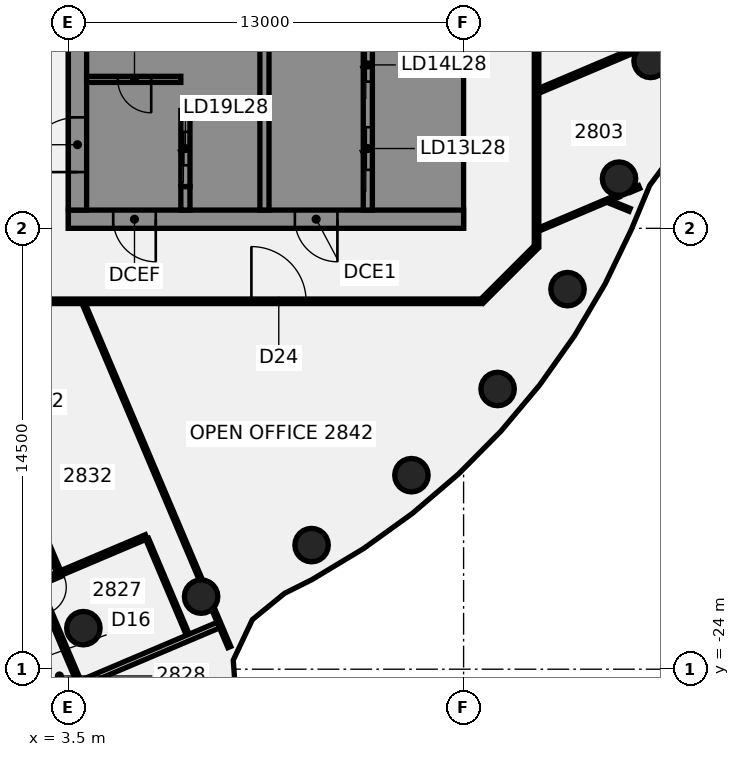
"""IFC4 building model, lengths in metres.
Left out: names, types, materials, properties, quantities, classifications, styles, units other than length and angle.
Written with IfcOpenShell. Run it as: python <this file> out.ifc"""

import sys

from ifc_helpers import new_model, si_unit, direction, frame, frame_2d, origin, origin_2d, place, context, subcontext, project, spatial, polyline, rectangle, circle, outline, extrude, element, fill, save


model = new_model("IFC4")
c1 = context("Model", 3, precision=1e-05, world=origin(), true_north=direction((0.0, 1.0)))
c2 = subcontext(c1, "Body", "Model", "MODEL_VIEW")
j1 = project(units=[si_unit("LENGTHUNIT", "METRE"), si_unit("PLANEANGLEUNIT", "RADIAN")], contexts=[c1])
p1 = place(None, origin())
s1 = spatial("IfcSite", under=j1, at=p1, CompositionType="ELEMENT")
p2 = place(p1, origin())
s2 = spatial("IfcBuilding", under=s1, at=p2, CompositionType="ELEMENT")
p3 = place(p2, frame((0.0, 0.0, 117.25)))
s3 = spatial("IfcBuildingStorey", under=s2, at=p3, CompositionType="ELEMENT", Elevation=117.25)
for number, where, z_axis, x_axis in (
    (1, (3.994, -22.651, -0.14), (0.0, 0.0, 1.0), (1.0, 0.0, 0.0)),
    (2, (7.866, -21.613, -0.14), (0.0, 0.0, 1.0), (1.0, 0.0, 0.0)),
    (3, (11.5, -19.919, -0.14), (0.0, 0.0, 1.0), (1.0, 0.0, 0.0)),
    (4, (14.784, -17.619, -0.14), (0.0, 0.0, 1.0), (1.0, 0.0, 0.0)),
    (5, (17.619, -14.784, -0.14), (0.0, 0.0, 1.0), (1.0, 0.0, 0.0)),
    (6, (19.919, -11.5, -0.14), (0.0, 0.0, 1.0), (1.0, 0.0, 0.0)),
    (7, (21.613, -7.866, -0.14), (0.0, 0.0, 1.0), (1.0, 0.0, 0.0)),
    (8, (22.651, -3.994, -0.14), (0.0, 0.0, 1.0), (1.0, 0.0, 0.0)),
):
    element("IfcColumn", number, at=place(p3, frame(where, z_axis=z_axis, x_axis=x_axis)), inside=s3, PredefinedType="COLUMN", context=c2, shape_type="SweptSolid", body=[
        extrude(circle(Radius=0.55, at=origin_2d()), origin(), (0.0, 0.0, 1.0), 3.75),
    ])
p4 = place(p3, frame((-0.554, -11.988, 0.0), z_axis=(0.0, 0.0, 1.0), x_axis=(0.390471755415, -0.920614907669, 0.0)))
e9 = element("IfcWall", 9, at=p4, inside=s3, PredefinedType="PARTITIONING", context=c2, shape_type="SweptSolid", body=[
    extrude(rectangle(XDim=9.554, YDim=0.15, at=frame_2d((4.777, 0.0))), origin(), (0.0, 0.0, 1.0), 3.01),
])
p5 = place(p4, frame((3.055, 0.0, 0.0)))
e10 = element("IfcOpeningElement", 10, at=p5, cuts=e9, PredefinedType="OPENING", context=c2, shape_type="SweptSolid", body=[
    extrude(rectangle(XDim=0.9, YDim=2.1, at=frame_2d((0.45, 1.05))), frame((0.0, 0.085, 0.0), z_axis=(0.0, -1.0, 0.0), x_axis=(1.0, 0.0, 0.0)), (0.0, 0.0, 1.0), 0.17),
])
p6 = place(p3, frame((1.68, -22.889, 0.0), z_axis=(0.0, 0.0, 1.0), x_axis=(0.390687971065, -0.920523171498, 0.0)))
e11 = element("IfcWall", 11, at=p6, inside=s3, PredefinedType="PARTITIONING", context=c2, shape_type="SweptSolid", body=[
    extrude(rectangle(XDim=15.75, YDim=0.15, at=frame_2d((7.875, 0.0))), origin(), (0.0, 0.0, 1.0), 3.01),
])
p7 = place(p6, frame((0.525, 0.0, 0.0)))
e12 = element("IfcOpeningElement", 12, at=p7, cuts=e11, PredefinedType="OPENING", context=c2, shape_type="SweptSolid", body=[
    extrude(rectangle(XDim=1.0, YDim=2.1, at=frame_2d((0.5, 1.05))), frame((0.0, 0.085, 0.0), z_axis=(0.0, -1.0, 0.0), x_axis=(1.0, 0.0, 0.0)), (0.0, 0.0, 1.0), 0.17),
])
p8 = place(p6, frame((12.075, 0.0, 0.0)))
e13 = element("IfcOpeningElement", 13, at=p8, cuts=e11, PredefinedType="OPENING", context=c2, shape_type="SweptSolid", body=[
    extrude(rectangle(XDim=0.9, YDim=2.1, at=frame_2d((0.45, 1.05))), frame((0.0, 0.085, 0.0), z_axis=(0.0, -1.0, 0.0), x_axis=(1.0, 0.0, 0.0)), (0.0, 0.0, 1.0), 0.17),
])
p9 = place(p6, frame((3.226, 0.0, 0.0)))
e14 = element("IfcOpeningElement", 14, at=p9, cuts=e11, PredefinedType="OPENING", context=c2, shape_type="SweptSolid", body=[
    extrude(rectangle(XDim=1.8, YDim=2.1, at=frame_2d((0.9, 1.05))), frame((0.0, 0.085, 0.0), z_axis=(0.0, -1.0, 0.0), x_axis=(1.0, 0.0, 0.0)), (0.0, 0.0, 1.0), 0.17),
])
p10 = place(p3, frame((2.48, -21.188, 0.0), z_axis=(0.0, 0.0, 1.0), x_axis=(0.390054258105, -0.920791874277, 0.0)))
e15 = element("IfcWall", 15, at=p10, inside=s3, PredefinedType="PARTITIONING", context=c2, shape_type="SweptSolid", body=[
    extrude(rectangle(XDim=3.479, YDim=0.15, at=frame_2d((1.74, 0.0))), origin(), (0.0, 0.0, 1.0), 3.01),
])
p11 = place(p10, frame((0.13, 0.0, 0.0)))
e16 = element("IfcOpeningElement", 16, at=p11, cuts=e15, PredefinedType="OPENING", context=c2, shape_type="SweptSolid", body=[
    extrude(rectangle(XDim=0.9, YDim=2.1, at=frame_2d((0.45, 1.05))), frame((0.0, 0.085, 0.0), z_axis=(0.0, -1.0, 0.0), x_axis=(1.0, 0.0, 0.0)), (0.0, 0.0, 1.0), 0.17),
])
p12 = place(p3, frame((4.004, -11.978, 0.0), z_axis=(0.0, 0.0, 1.0), x_axis=(0.390495164952, -0.920604978342, 0.0)))
e17 = element("IfcWall", 17, at=p12, inside=s3, PredefinedType="PARTITIONING", context=c2, shape_type="SweptSolid", body=[
    extrude(rectangle(XDim=9.861, YDim=0.1, at=frame_2d((4.93, 0.0))), origin(), (0.0, 0.0, 1.0), 3.01),
])
p13 = place(p3, frame((8.252, -21.992, 0.0), z_axis=(0.0, 0.0, 1.0), x_axis=(0.390522765708, -0.920593270377, 0.0)))
e18 = element("IfcWall", 18, at=p13, inside=s3, PredefinedType="PARTITIONING", context=c2, shape_type="SweptSolid", body=[
    extrude(rectangle(XDim=1.389, YDim=0.1, at=frame_2d((0.695, 0.0))), origin(), (0.0, 0.0, 1.0), 3.01),
])
p14 = place(p3, frame((6.091, -19.715, 0.0), z_axis=(0.0, 0.0, 1.0), x_axis=(0.390573680368, -0.920571670324, 0.0)))
e19 = element("IfcWall", 19, at=p14, inside=s3, PredefinedType="PARTITIONING", context=c2, shape_type="SweptSolid", body=[
    extrude(rectangle(XDim=3.42, YDim=0.1, at=frame_2d((1.71, 0.0))), origin(), (0.0, 0.0, 1.0), 3.01),
])
p15 = place(p3, frame((22.561, 8.406, 0.0), z_axis=(0.0, 0.0, 1.0), x_axis=(0.390723572262, -0.920508060844, 0.0)))
e20 = element("IfcWall", 20, at=p15, inside=s3, PredefinedType="PARTITIONING", context=c2, shape_type="SweptSolid", body=[
    extrude(rectangle(XDim=14.219, YDim=0.2, at=frame_2d((7.109, 0.0))), origin(), (0.0, 0.0, 1.0), 3.01),
])
p16 = place(p15, frame((6.919, 0.0, 0.0)))
e21 = element("IfcOpeningElement", 21, at=p16, cuts=e20, PredefinedType="OPENING", context=c2, shape_type="SweptSolid", body=[
    extrude(rectangle(XDim=1.4, YDim=2.1, at=frame_2d((0.7, 1.05))), frame((0.0, 0.11, 0.0), z_axis=(0.0, -1.0, 0.0), x_axis=(1.0, 0.0, 0.0)), (0.0, 0.0, 1.0), 0.22),
])
p17 = place(p3, frame((21.307, -8.627, 0.0), z_axis=(0.0, 0.0, 1.0), x_axis=(0.926918170947, -0.375263513238, 0.0)))
e22 = element("IfcWall", 22, at=p17, inside=s3, PredefinedType="PARTITIONING", context=c2, shape_type="SweptSolid", body=[
    extrude(rectangle(XDim=0.706, YDim=0.1, at=frame_2d((0.353, 0.0))), origin(), (0.0, 0.0, 1.0), 3.01),
])
p18 = place(p3, frame((-17.1, -11.9, 0.0), z_axis=(0.0, 0.0, 1.0), x_axis=(1.0, 0.0, 0.0)))
e23 = element("IfcWall", 23, at=p18, inside=s3, PredefinedType="PARTITIONING", context=c2, shape_type="SweptSolid", body=[
    extrude(rectangle(XDim=34.165, YDim=0.15, at=frame_2d((17.083, 0.0))), origin(), (0.0, 0.0, 1.0), 3.01),
])
p19 = place(p18, frame((11.973, 0.0, 0.0)))
e24 = element("IfcOpeningElement", 24, at=p19, cuts=e23, PredefinedType="OPENING", context=c2, shape_type="SweptSolid", body=[
    extrude(rectangle(XDim=1.8, YDim=2.1, at=frame_2d((0.9, 1.05))), frame((0.0, 0.085, 0.0), z_axis=(0.0, -1.0, 0.0), x_axis=(1.0, 0.0, 0.0)), (0.0, 0.0, 1.0), 0.17),
])
p20 = place(p18, frame((2.1, 0.0, 0.0)))
e25 = element("IfcOpeningElement", 25, at=p20, cuts=e23, PredefinedType="OPENING", context=c2, shape_type="SweptSolid", body=[
    extrude(rectangle(XDim=1.8, YDim=2.1, at=frame_2d((0.9, 1.05))), frame((0.0, 0.085, 0.0), z_axis=(0.0, -1.0, 0.0), x_axis=(1.0, 0.0, 0.0)), (0.0, 0.0, 1.0), 0.17),
])
p21 = place(p18, frame((26.621, 0.0, 0.0)))
e26 = element("IfcOpeningElement", 26, at=p21, cuts=e23, PredefinedType="OPENING", context=c2, shape_type="SweptSolid", body=[
    extrude(rectangle(XDim=1.8, YDim=2.1, at=frame_2d((0.9, 1.05))), frame((0.0, 0.085, 0.0), z_axis=(0.0, -1.0, 0.0), x_axis=(1.0, 0.0, 0.0)), (0.0, 0.0, 1.0), 0.17),
])
p22 = place(p3, frame((2.472, -21.169, 0.0), z_axis=(0.0, 0.0, 1.0), x_axis=(0.920615200633, 0.390471064695, 0.0)))
e27 = element("IfcWall", 27, at=p22, inside=s3, PredefinedType="PARTITIONING", context=c2, shape_type="SweptSolid", body=[
    extrude(rectangle(XDim=3.9, YDim=0.15, at=frame_2d((1.95, 0.0))), origin(), (0.0, 0.0, 1.0), 3.01),
])
p23 = place(p3, frame((-4.683, -28.115, 0.0), z_axis=(0.0, 0.0, 1.0), x_axis=(0.920579915117, 0.390554247044, 0.0)))
e28 = element("IfcWall", 28, at=p23, inside=s3, PredefinedType="PARTITIONING", context=c2, shape_type="SweptSolid", body=[
    extrude(rectangle(XDim=14.249, YDim=0.2, at=frame_2d((7.125, 0.0))), origin(), (0.0, 0.0, 1.0), 3.01),
])
p24 = place(p23, frame((5.799, 0.0, 0.0)))
e29 = element("IfcOpeningElement", 29, at=p24, cuts=e28, PredefinedType="OPENING", context=c2, shape_type="SweptSolid", body=[
    extrude(rectangle(XDim=1.4, YDim=2.1, at=frame_2d((0.7, 1.05))), frame((0.0, 0.11, 0.0), z_axis=(0.0, -1.0, 0.0), x_axis=(1.0, 0.0, 0.0)), (0.0, 0.0, 1.0), 0.22),
])
p25 = place(p3, frame((18.978, -9.537, 0.0), z_axis=(0.0, 0.0, 1.0), x_axis=(0.920657329296, 0.390371722866, 0.0)))
e30 = element("IfcWall", 30, at=p25, inside=s3, PredefinedType="PARTITIONING", context=c2, shape_type="SweptSolid", body=[
    extrude(rectangle(XDim=2.851, YDim=0.1, at=frame_2d((1.426, 0.0))), origin(), (0.0, 0.0, 1.0), 3.01),
])
p26 = place(p3, frame((21.98, -8.264, 0.0), z_axis=(0.0, 0.0, 1.0), x_axis=(0.92075636917, 0.390138063554, 0.0)))
e31 = element("IfcWall", 31, at=p26, inside=s3, PredefinedType="PARTITIONING", context=c2, shape_type="SweptSolid", body=[
    extrude(rectangle(XDim=0.32, YDim=0.1, at=frame_2d((0.16, 0.0))), origin(), (0.0, 0.0, 1.0), 3.01),
])
p27 = place(p3, frame((18.988, -4.971, 0.0), z_axis=(0.0, 0.0, 1.0), x_axis=(0.920588387511, 0.390534276063, 0.0)))
e32 = element("IfcWall", 32, at=p27, inside=s3, PredefinedType="PARTITIONING", context=c2, shape_type="SweptSolid", body=[
    extrude(rectangle(XDim=3.624, YDim=0.15, at=frame_2d((1.812, 0.0))), origin(), (0.0, 0.0, 1.0), 3.01),
])
p28 = place(p3, frame((17.1, -11.9, 0.0), z_axis=(0.0, 0.0, 1.0), x_axis=(0.707106781187, 0.707106781187, 0.0)))
e33 = element("IfcWall", 33, at=p28, inside=s3, PredefinedType="PARTITIONING", context=c2, shape_type="SweptSolid", body=[
    extrude(rectangle(XDim=2.505, YDim=0.15, at=frame_2d((1.253, 0.0))), origin(), (0.0, 0.0, 1.0), 3.01),
])
p29 = place(p3, frame((18.9, -10.1, 0.0), z_axis=(0.0, 0.0, 1.0), x_axis=(0.0, 1.0, 0.0)))
e34 = element("IfcWall", 34, at=p29, inside=s3, PredefinedType="PARTITIONING", context=c2, shape_type="SweptSolid", body=[
    extrude(rectangle(XDim=20.2, YDim=0.15, at=frame_2d((10.1, 0.0))), origin(), (0.0, 0.0, 1.0), 3.01),
])
p30 = place(p29, frame((8.692, 0.0, 0.0)))
e35 = element("IfcOpeningElement", 35, at=p30, cuts=e34, PredefinedType="OPENING", context=c2, shape_type="SweptSolid", body=[
    extrude(rectangle(XDim=1.8, YDim=2.1, at=frame_2d((0.9, 1.05))), frame((0.0, 0.085, 0.0), z_axis=(0.0, -1.0, 0.0), x_axis=(1.0, 0.0, 0.0)), (0.0, 0.0, 1.0), 0.17),
])
p31 = place(p29, frame((13.828, 0.0, 0.0)))
e36 = element("IfcOpeningElement", 36, at=p31, cuts=e34, PredefinedType="OPENING", context=c2, shape_type="SweptSolid", body=[
    extrude(rectangle(XDim=0.9, YDim=2.1, at=frame_2d((0.45, 1.05))), frame((0.0, 0.085, 0.0), z_axis=(0.0, -1.0, 0.0), x_axis=(1.0, 0.0, 0.0)), (0.0, 0.0, 1.0), 0.17),
])
p32 = place(p3, frame((16.5, -9.2, 0.0), z_axis=(0.0, 0.0, 1.0), x_axis=(-1.0, 0.0, 0.0)))
e37 = element("IfcWall", 37, at=p32, inside=s3, PredefinedType="SHEAR", context=c2, shape_type="SweptSolid", body=[
    extrude(rectangle(XDim=13.0, YDim=0.6, at=frame_2d((6.5, 0.0))), origin(), (0.0, 0.0, 1.0), 3.61),
])
p33 = place(p32, frame((4.15, 0.0, 0.0)))
e38 = element("IfcOpeningElement", 38, at=p33, cuts=e37, PredefinedType="OPENING", context=c2, shape_type="SweptSolid", body=[
    extrude(rectangle(XDim=1.4, YDim=2.1, at=frame_2d((0.7, 1.05))), frame((0.0, 0.31, 0.0), z_axis=(0.0, -1.0, 0.0), x_axis=(1.0, 0.0, 0.0)), (0.0, 0.0, 1.0), 0.62),
])
p34 = place(p32, frame((10.125, 0.0, 0.0)))
e39 = element("IfcOpeningElement", 39, at=p34, cuts=e37, PredefinedType="OPENING", context=c2, shape_type="SweptSolid", body=[
    extrude(rectangle(XDim=1.4, YDim=2.1, at=frame_2d((0.7, 1.05))), frame((0.0, 0.31, 0.0), z_axis=(0.0, -1.0, 0.0), x_axis=(1.0, 0.0, 0.0)), (0.0, 0.0, 1.0), 0.62),
])
p35 = place(p3, origin())
e40 = element("IfcWall", 40, at=p35, inside=s3, PredefinedType="SHEAR", context=c2, shape_type="SweptSolid", body=[
    extrude(outline(polyline([(13.5, -8.9), (15.9, -8.9), (16.5, -8.9), (16.5, 8.9), (15.9, 8.9), (13.5, 8.9), (13.5, 8.125), (15.9, 8.125), (15.9, 5.625), (13.5, 5.625), (13.5, 5.375), (15.9, 5.375), (15.9, 2.875), (13.5, 2.875), (13.5, 2.625), (15.9, 2.625), (15.9, 0.125), (13.5, 0.125), (13.5, -0.125), (15.9, -0.125), (15.9, -2.625), (13.5, -2.625), (13.5, -2.875), (15.9, -2.875), (15.9, -5.375), (13.5, -5.375), (13.5, -5.625), (15.9, -5.625), (15.9, -8.125), (13.5, -8.125), (13.5, -8.9)])), origin(), (0.0, 0.0, 1.0), 3.61),
])
p36 = place(p3, origin())
e41 = element("IfcWall", 41, at=p36, inside=s3, PredefinedType="SHEAR", context=c2, shape_type="SweptSolid", body=[
    extrude(outline(polyline([(9.8, -5.375), (7.5, -5.375), (7.5, -2.875), (9.8, -2.875), (9.8, -2.625), (7.5, -2.625), (7.5, -0.125), (9.8, -0.125), (9.8, 0.125), (7.5, 0.125), (7.5, 2.625), (9.8, 2.625), (9.8, 2.875), (7.5, 2.875), (7.5, 5.375), (9.8, 5.375), (9.8, 5.625), (7.5, 5.625), (7.5, 8.125), (9.8, 8.125), (9.8, 8.9), (7.5, 8.9), (7.2, 8.9), (7.2, -5.625), (7.5, -5.625), (9.8, -5.625), (9.8, -5.375)])), origin(), (0.0, 0.0, 1.0), 3.61),
])
p37 = place(p3, origin())
e42 = element("IfcWall", 42, at=p37, inside=s3, PredefinedType="SHEAR", context=c2, shape_type="SweptSolid", body=[
    extrude(outline(polyline([(7.5, -8.125), (7.5, -8.9), (9.8, -8.9), (9.8, -8.125), (9.8, -5.625), (9.55, -5.625), (9.55, -8.125), (7.5, -8.125)])), origin(), (0.0, 0.0, 1.0), 3.61),
])
p38 = place(p3, frame((7.35, -8.9, 0.0), z_axis=(0.0, 0.0, 1.0), x_axis=(0.0, 1.0, 0.0)))
e43 = element("IfcWall", 43, at=p38, inside=s3, PredefinedType="SHEAR", context=c2, shape_type="SweptSolid", body=[
    extrude(rectangle(XDim=0.775, YDim=0.3, at=frame_2d((0.387, 0.0))), origin(), (0.0, 0.0, 1.0), 3.61),
])
p39 = place(p3, frame((13.35, -8.9, 0.0), z_axis=(0.0, 0.0, 1.0), x_axis=(0.0, 1.0, 0.0)))
e44 = element("IfcWall", 44, at=p39, inside=s3, PredefinedType="SHEAR", context=c2, shape_type="SweptSolid", body=[
    extrude(rectangle(XDim=17.8, YDim=0.3, at=frame_2d((8.9, 0.0))), origin(), (0.0, 0.0, 1.0), 3.61),
])
p40 = place(p39, frame((1.325, 0.0, 0.0)))
e45 = element("IfcOpeningElement", 45, at=p40, cuts=e44, PredefinedType="OPENING", context=c2, shape_type="SweptSolid", body=[
    extrude(rectangle(XDim=1.4, YDim=2.1, at=frame_2d((0.7, 1.05))), frame((0.0, 0.16, 0.0), z_axis=(0.0, -1.0, 0.0), x_axis=(1.0, 0.0, 0.0)), (0.0, 0.0, 1.0), 0.32),
])
p41 = place(p39, frame((4.225, 0.0, 0.0)))
e46 = element("IfcOpeningElement", 46, at=p41, cuts=e44, PredefinedType="OPENING", context=c2, shape_type="SweptSolid", body=[
    extrude(rectangle(XDim=1.1, YDim=2.1, at=frame_2d((0.55, 1.05))), frame((0.0, 0.16, 0.0), z_axis=(0.0, -1.0, 0.0), x_axis=(1.0, 0.0, 0.0)), (0.0, 0.0, 1.0), 0.32),
])
p42 = place(p39, frame((6.975, 0.0, 0.0)))
e47 = element("IfcOpeningElement", 47, at=p42, cuts=e44, PredefinedType="OPENING", context=c2, shape_type="SweptSolid", body=[
    extrude(rectangle(XDim=1.1, YDim=2.1, at=frame_2d((0.55, 1.05))), frame((0.0, 0.16, 0.0), z_axis=(0.0, -1.0, 0.0), x_axis=(1.0, 0.0, 0.0)), (0.0, 0.0, 1.0), 0.32),
])
p43 = place(p39, frame((9.725, 0.0, 0.0)))
e48 = element("IfcOpeningElement", 48, at=p43, cuts=e44, PredefinedType="OPENING", context=c2, shape_type="SweptSolid", body=[
    extrude(rectangle(XDim=1.1, YDim=2.1, at=frame_2d((0.55, 1.05))), frame((0.0, 0.16, 0.0), z_axis=(0.0, -1.0, 0.0), x_axis=(1.0, 0.0, 0.0)), (0.0, 0.0, 1.0), 0.32),
])
p44 = place(p39, frame((12.475, 0.0, 0.0)))
e49 = element("IfcOpeningElement", 49, at=p44, cuts=e44, PredefinedType="OPENING", context=c2, shape_type="SweptSolid", body=[
    extrude(rectangle(XDim=1.1, YDim=2.1, at=frame_2d((0.55, 1.05))), frame((0.0, 0.16, 0.0), z_axis=(0.0, -1.0, 0.0), x_axis=(1.0, 0.0, 0.0)), (0.0, 0.0, 1.0), 0.32),
])
p45 = place(p3, frame((9.95, -8.9, 0.0), z_axis=(0.0, 0.0, 1.0), x_axis=(0.0, 1.0, 0.0)))
e50 = element("IfcWall", 50, at=p45, inside=s3, PredefinedType="SHEAR", context=c2, shape_type="SweptSolid", body=[
    extrude(rectangle(XDim=17.8, YDim=0.3, at=frame_2d((8.9, 0.0))), origin(), (0.0, 0.0, 1.0), 3.61),
])
p46 = place(p3, frame((7.35, -8.125, 0.0), z_axis=(0.0, 0.0, 1.0), x_axis=(0.0, 1.0, 0.0)))
e51 = element("IfcWall", 51, at=p46, inside=s3, PredefinedType="SHEAR", context=c2, shape_type="SweptSolid", body=[
    extrude(rectangle(XDim=2.5, YDim=0.3, at=frame_2d((1.25, 0.0))), origin(), (0.0, 0.0, 1.0), 3.61),
])
p47 = place(p46, frame((0.7, 0.0, 0.0)))
e52 = element("IfcOpeningElement", 52, at=p47, cuts=e51, PredefinedType="OPENING", context=c2, shape_type="SweptSolid", body=[
    extrude(rectangle(XDim=1.1, YDim=2.1, at=frame_2d((0.55, 1.05))), frame((0.0, 0.16, 0.0), z_axis=(0.0, -1.0, 0.0), x_axis=(1.0, 0.0, 0.0)), (0.0, 0.0, 1.0), 0.32),
])
p48 = place(p3, frame((3.8, -8.9, 0.0), z_axis=(0.0, 0.0, 1.0), x_axis=(0.0, 1.0, 0.0)))
e53 = element("IfcWall", 53, at=p48, inside=s3, PredefinedType="SHEAR", context=c2, shape_type="SweptSolid", body=[
    extrude(rectangle(XDim=17.8, YDim=0.6, at=frame_2d((8.9, 0.0))), origin(), (0.0, 0.0, 1.0), 3.61),
])
p49 = place(p48, frame((1.25, 0.0, 0.0)))
e54 = element("IfcOpeningElement", 54, at=p49, cuts=e53, PredefinedType="OPENING", context=c2, shape_type="SweptSolid", body=[
    extrude(rectangle(XDim=1.8, YDim=2.1, at=frame_2d((0.9, 1.05))), frame((0.0, 0.31, 0.0), z_axis=(0.0, -1.0, 0.0), x_axis=(1.0, 0.0, 0.0)), (0.0, 0.0, 1.0), 0.62),
])
p50 = place(p48, frame((11.698, 0.0, 0.0)))
e55 = element("IfcOpeningElement", 55, at=p50, cuts=e53, PredefinedType="OPENING", context=c2, shape_type="SweptSolid", body=[
    extrude(rectangle(XDim=1.0, YDim=2.1, at=frame_2d((0.5, 1.05))), frame((0.0, 0.31, 0.0), z_axis=(0.0, -1.0, 0.0), x_axis=(1.0, 0.0, 0.0)), (0.0, 0.0, 1.0), 0.62),
])
p51 = place(p48, frame((15.222, 0.0, 0.0)))
e56 = element("IfcOpeningElement", 56, at=p51, cuts=e53, PredefinedType="OPENING", context=c2, shape_type="SweptSolid", body=[
    extrude(rectangle(XDim=1.0, YDim=2.1, at=frame_2d((0.5, 1.05))), frame((0.0, 0.31, 0.0), z_axis=(0.0, -1.0, 0.0), x_axis=(1.0, 0.0, 0.0)), (0.0, 0.0, 1.0), 0.62),
])
p52 = place(p3, frame((7.2, -4.6, 0.0), z_axis=(0.0, 0.0, 1.0), x_axis=(-1.0, 0.0, 0.0)))
e57 = element("IfcWall", 57, at=p52, inside=s3, PredefinedType="SHEAR", context=c2, shape_type="SweptSolid", body=[
    extrude(rectangle(XDim=3.1, YDim=0.2, at=frame_2d((1.55, 0.0))), origin(), (0.0, 0.0, 1.0), 3.61),
])
p53 = place(p52, frame((0.975, 0.0, 0.0)))
e58 = element("IfcOpeningElement", 58, at=p53, cuts=e57, PredefinedType="OPENING", context=c2, shape_type="SweptSolid", body=[
    extrude(rectangle(XDim=1.1, YDim=2.1, at=frame_2d((0.55, 1.05))), frame((0.0, 0.11, 0.0), z_axis=(0.0, -1.0, 0.0), x_axis=(1.0, 0.0, 0.0)), (0.0, 0.0, 1.0), 0.22),
])
p54 = place(p21, frame((1.8, 0.0, 0.0), z_axis=(0.0, 0.0, 1.0), x_axis=(-1.0, 0.0, 0.0)))
e59 = element("IfcDoor", 59, at=p54, inside=s3, OperationType="DOUBLE_DOOR_SINGLE_SWING", PredefinedType="DOOR", context=c2, shape_type="SweptSolid", body=[
    extrude(rectangle(XDim=1.8, YDim=2.1, at=frame_2d((0.9, 1.05))), frame((0.0, 0.025, 0.0), z_axis=(0.0, -1.0, 0.0), x_axis=(1.0, 0.0, 0.0)), (0.0, 0.0, 1.0), 0.05),
])
fill(e26, e59)
p55 = place(p33, origin())
e60 = element("IfcDoor", 60, at=p55, inside=s3, OperationType="SINGLE_SWING_LEFT", PredefinedType="DOOR", context=c2, shape_type="SweptSolid", body=[
    extrude(rectangle(XDim=1.4, YDim=2.1, at=frame_2d((0.7, 1.05))), frame((0.0, 0.025, 0.0), z_axis=(0.0, -1.0, 0.0), x_axis=(1.0, 0.0, 0.0)), (0.0, 0.0, 1.0), 0.05),
])
fill(e38, e60)
p56 = place(p34, origin())
e61 = element("IfcDoor", 61, at=p56, inside=s3, OperationType="SINGLE_SWING_LEFT", PredefinedType="DOOR", context=c2, shape_type="SweptSolid", body=[
    extrude(rectangle(XDim=1.4, YDim=2.1, at=frame_2d((0.7, 1.05))), frame((0.0, 0.025, 0.0), z_axis=(0.0, -1.0, 0.0), x_axis=(1.0, 0.0, 0.0)), (0.0, 0.0, 1.0), 0.05),
])
fill(e39, e61)
p57 = place(p49, origin())
e62 = element("IfcDoor", 62, at=p57, inside=s3, OperationType="SINGLE_SWING_LEFT", PredefinedType="DOOR", context=c2, shape_type="SweptSolid", body=[
    extrude(rectangle(XDim=1.8, YDim=2.1, at=frame_2d((0.9, 1.05))), frame((0.0, 0.025, 0.0), z_axis=(0.0, -1.0, 0.0), x_axis=(1.0, 0.0, 0.0)), (0.0, 0.0, 1.0), 0.05),
])
fill(e54, e62)
p58 = place(p53, origin())
e63 = element("IfcDoor", 63, at=p58, inside=s3, OperationType="SINGLE_SWING_LEFT", PredefinedType="DOOR", context=c2, shape_type="SweptSolid", body=[
    extrude(rectangle(XDim=1.1, YDim=2.1, at=frame_2d((0.55, 1.05))), frame((0.0, 0.025, 0.0), z_axis=(0.0, -1.0, 0.0), x_axis=(1.0, 0.0, 0.0)), (0.0, 0.0, 1.0), 0.05),
])
fill(e58, e63)
p59 = place(p40, origin())
e64 = element("IfcDoor", 64, at=p59, inside=s3, OperationType="SLIDING_TO_LEFT", PredefinedType="DOOR", context=c2, shape_type="SweptSolid", body=[
    extrude(rectangle(XDim=1.4, YDim=2.1, at=frame_2d((0.7, 1.05))), frame((0.0, 0.025, 0.0), z_axis=(0.0, -1.0, 0.0), x_axis=(1.0, 0.0, 0.0)), (0.0, 0.0, 1.0), 0.05),
])
fill(e45, e64)
p60 = place(p41, origin())
e65 = element("IfcDoor", 65, at=p60, inside=s3, OperationType="SLIDING_TO_LEFT", PredefinedType="DOOR", context=c2, shape_type="SweptSolid", body=[
    extrude(rectangle(XDim=1.1, YDim=2.1, at=frame_2d((0.55, 1.05))), frame((0.0, 0.025, 0.0), z_axis=(0.0, -1.0, 0.0), x_axis=(1.0, 0.0, 0.0)), (0.0, 0.0, 1.0), 0.05),
])
fill(e46, e65)
p61 = place(p47, origin())
e66 = element("IfcDoor", 66, at=p61, inside=s3, OperationType="SLIDING_TO_LEFT", PredefinedType="DOOR", context=c2, shape_type="SweptSolid", body=[
    extrude(rectangle(XDim=1.1, YDim=2.1, at=frame_2d((0.55, 1.05))), frame((0.0, 0.025, 0.0), z_axis=(0.0, -1.0, 0.0), x_axis=(1.0, 0.0, 0.0)), (0.0, 0.0, 1.0), 0.05),
])
fill(e52, e66)
save(model, sys.argv[1])
